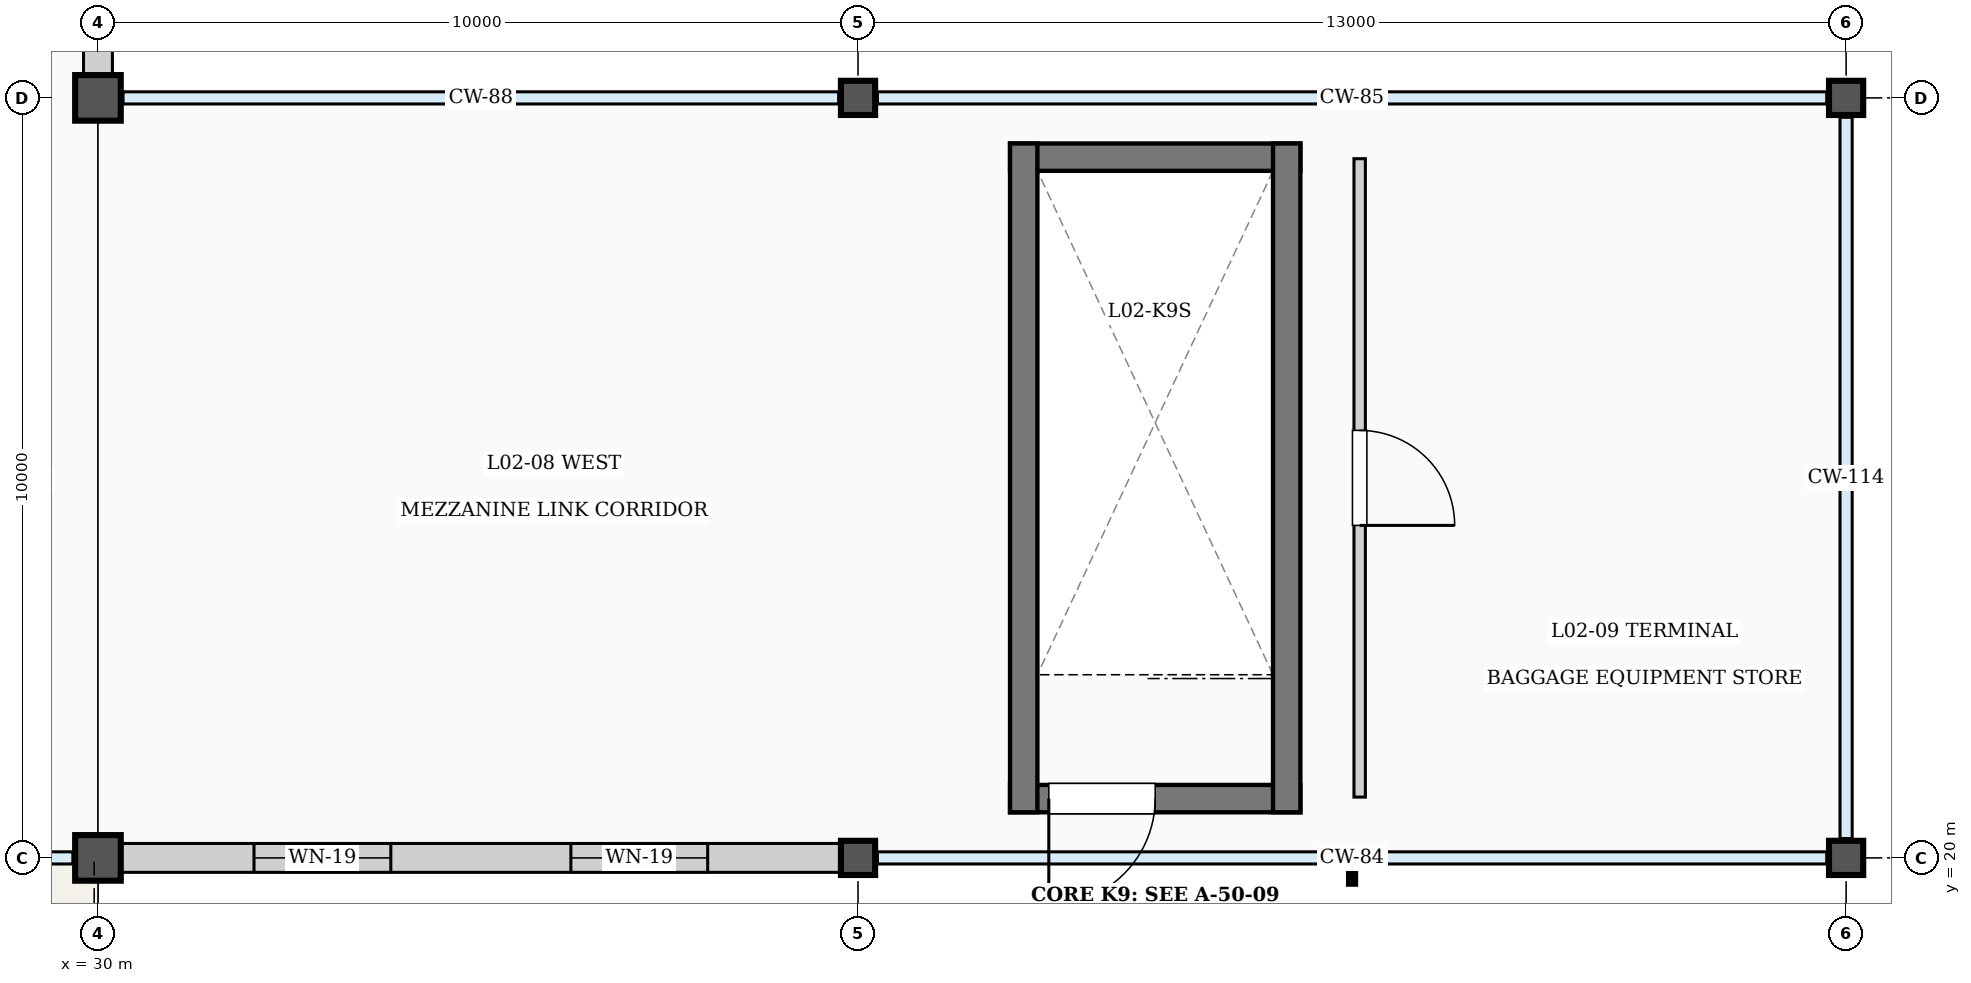
"""IFC4 building model, lengths in metres.
Left out: names, types, materials, properties, quantities, classifications, styles, units other than length and angle.
Written with IfcOpenShell. Run it as: python <this file> out.ifc"""

import sys

from ifc_helpers import new_model, si_unit, direction, frame, frame_2d, origin, origin_2d, place, context, subcontext, project, spatial, rectangle, extrude, element, fill, save


model = new_model("IFC4")
c1 = context("Model", 3, precision=1e-05, world=origin(), true_north=direction((0.0, 1.0)))
c2 = subcontext(c1, "Body", "Model", "MODEL_VIEW")
j1 = project(units=[si_unit("LENGTHUNIT", "METRE"), si_unit("PLANEANGLEUNIT", "RADIAN")], contexts=[c1])
p1 = place(None, origin())
s1 = spatial("IfcSite", under=j1, at=p1, CompositionType="ELEMENT")
p2 = place(p1, origin())
s2 = spatial("IfcBuilding", under=s1, at=p2, CompositionType="ELEMENT")
p3 = place(p2, frame((0.0, 0.0, 10.2)))
s3 = spatial("IfcBuildingStorey", under=s2, at=p3, CompositionType="ELEMENT", Elevation=10.2)
for number, where, z_axis, x_axis in (
    (1, (30.0, 20.0, 0.0), (0.0, 0.0, 1.0), (1.0, 0.0, 0.0)),
    (2, (30.0, 30.0, 0.0), (0.0, 0.0, 1.0), (1.0, 0.0, 0.0)),
):
    element("IfcColumn", number, at=place(p3, frame(where, z_axis=z_axis, x_axis=x_axis)), inside=s3, PredefinedType="COLUMN", context=c2, shape_type="SweptSolid", body=[
        extrude(rectangle(XDim=0.6, YDim=0.6, at=origin_2d()), origin(), (0.0, 0.0, 1.0), 4.2),
    ])
for number, where, z_axis, x_axis in (
    (3, (40.0, 20.0, 0.0), (0.0, 0.0, 1.0), (1.0, 0.0, 0.0)),
    (4, (40.0, 30.0, 0.0), (0.0, 0.0, 1.0), (1.0, 0.0, 0.0)),
    (5, (53.0, 20.0, 0.0), (0.0, 0.0, 1.0), (1.0, 0.0, 0.0)),
    (6, (53.0, 30.0, 0.0), (0.0, 0.0, 1.0), (1.0, 0.0, 0.0)),
):
    element("IfcColumn", number, at=place(p3, frame(where, z_axis=z_axis, x_axis=x_axis)), inside=s3, PredefinedType="COLUMN", context=c2, shape_type="SweptSolid", body=[
        extrude(rectangle(XDim=0.45, YDim=0.45, at=origin_2d()), origin(), (0.0, 0.0, 1.0), 4.2),
    ])
p4 = place(p3, frame((30.3, 20.0, 0.0), z_axis=(0.0, 0.0, 1.0), x_axis=(1.0, 0.0, 0.0)))
e7 = element("IfcWall", 7, at=p4, inside=s3, PredefinedType="SOLIDWALL", context=c2, shape_type="SweptSolid", body=[
    extrude(rectangle(XDim=9.475, YDim=0.38, at=frame_2d((4.737, 0.0))), origin(), (0.0, 0.0, 1.0), 3.63),
])
p5 = place(p4, frame((1.753, 0.0, 0.9)))
e8 = element("IfcOpeningElement", 8, at=p5, cuts=e7, PredefinedType="OPENING", context=c2, shape_type="SweptSolid", body=[
    extrude(rectangle(XDim=1.8, YDim=2.1, at=frame_2d((0.9, 1.05))), frame((0.0, 0.2, 0.0), z_axis=(0.0, -1.0, 0.0), x_axis=(1.0, 0.0, 0.0)), (0.0, 0.0, 1.0), 0.4),
])
p6 = place(p4, frame((5.922, 0.0, 0.9)))
e9 = element("IfcOpeningElement", 9, at=p6, cuts=e7, PredefinedType="OPENING", context=c2, shape_type="SweptSolid", body=[
    extrude(rectangle(XDim=1.8, YDim=2.1, at=frame_2d((0.9, 1.05))), frame((0.0, 0.2, 0.0), z_axis=(0.0, -1.0, 0.0), x_axis=(1.0, 0.0, 0.0)), (0.0, 0.0, 1.0), 0.4),
])
p7 = place(p3, frame((30.0, 39.7, 0.0), z_axis=(0.0, 0.0, 1.0), x_axis=(0.0, -1.0, 0.0)))
e10 = element("IfcWall", 10, at=p7, inside=s3, PredefinedType="SOLIDWALL", context=c2, shape_type="SweptSolid", body=[
    extrude(rectangle(XDim=9.4, YDim=0.38, at=frame_2d((4.7, 0.0))), origin(), (0.0, 0.0, 1.0), 3.27),
])
p8 = place(p7, frame((1.732, 0.0, 0.9)))
e11 = element("IfcOpeningElement", 11, at=p8, cuts=e10, PredefinedType="OPENING", context=c2, shape_type="SweptSolid", body=[
    extrude(rectangle(XDim=1.8, YDim=1.5, at=frame_2d((0.9, 0.75))), frame((0.0, 0.2, 0.0), z_axis=(0.0, -1.0, 0.0), x_axis=(1.0, 0.0, 0.0)), (0.0, 0.0, 1.0), 0.4),
])
p9 = place(p7, frame((5.868, 0.0, 0.9)))
e12 = element("IfcOpeningElement", 12, at=p9, cuts=e10, PredefinedType="OPENING", context=c2, shape_type="SweptSolid", body=[
    extrude(rectangle(XDim=1.8, YDim=1.5, at=frame_2d((0.9, 0.75))), frame((0.0, 0.2, 0.0), z_axis=(0.0, -1.0, 0.0), x_axis=(1.0, 0.0, 0.0)), (0.0, 0.0, 1.0), 0.4),
])
p10 = place(p3, frame((42.0, 20.78, 0.0), z_axis=(0.0, 0.0, 1.0), x_axis=(1.0, 0.0, 0.0)))
e13 = element("IfcWall", 13, at=p10, inside=s3, PredefinedType="SHEAR", context=c2, shape_type="SweptSolid", body=[
    extrude(rectangle(XDim=3.82, YDim=0.36, at=frame_2d((1.91, 0.0))), origin(), (0.0, 0.0, 1.0), 4.2),
])
p11 = place(p10, frame((0.51, 0.0, 0.0)))
e14 = element("IfcOpeningElement", 14, at=p11, cuts=e13, PredefinedType="OPENING", context=c2, shape_type="SweptSolid", body=[
    extrude(rectangle(XDim=1.4, YDim=2.35, at=frame_2d((0.7, 1.175))), frame((0.0, 0.19, 0.0), z_axis=(0.0, -1.0, 0.0), x_axis=(1.0, 0.0, 0.0)), (0.0, 0.0, 1.0), 0.38),
])
p12 = place(p3, frame((42.0, 29.22, 0.0), z_axis=(0.0, 0.0, 1.0), x_axis=(1.0, 0.0, 0.0)))
e15 = element("IfcWall", 15, at=p12, inside=s3, PredefinedType="SHEAR", context=c2, shape_type="SweptSolid", body=[
    extrude(rectangle(XDim=3.82, YDim=0.36, at=frame_2d((1.91, 0.0))), origin(), (0.0, 0.0, 1.0), 4.2),
])
for number, where, z_axis, x_axis in (
    (16, (42.18, 20.6, 0.0), (0.0, 0.0, 1.0), (0.0, 1.0, 0.0)),
    (17, (45.64, 20.6, 0.0), (0.0, 0.0, 1.0), (0.0, 1.0, 0.0)),
):
    element("IfcWall", number, at=place(p3, frame(where, z_axis=z_axis, x_axis=x_axis)), inside=s3, PredefinedType="SHEAR", context=c2, shape_type="SweptSolid", body=[
        extrude(rectangle(XDim=8.8, YDim=0.36, at=frame_2d((4.4, 0.0))), origin(), (0.0, 0.0, 1.0), 4.2),
    ])
p13 = place(p3, frame((46.6, 20.8, 0.0), z_axis=(0.0, 0.0, 1.0), x_axis=(0.0, 1.0, 0.0)))
e18 = element("IfcWall", 18, at=p13, inside=s3, PredefinedType="PARTITIONING", context=c2, shape_type="SweptSolid", body=[
    extrude(rectangle(XDim=8.4, YDim=0.15, at=frame_2d((4.2, 0.0))), origin(), (0.0, 0.0, 1.0), 3.86),
])
p14 = place(p13, frame((3.575, 0.0, 0.0)))
e19 = element("IfcOpeningElement", 19, at=p14, cuts=e18, PredefinedType="OPENING", context=c2, shape_type="SweptSolid", body=[
    extrude(rectangle(XDim=1.25, YDim=2.4, at=frame_2d((0.625, 1.2))), frame((0.0, 0.085, 0.0), z_axis=(0.0, -1.0, 0.0), x_axis=(1.0, 0.0, 0.0)), (0.0, 0.0, 1.0), 0.17),
])
p15 = place(p5, origin())
e20 = element("IfcWindow", 20, at=p15, inside=s3, PartitioningType="SINGLE_PANEL", PredefinedType="WINDOW", context=c2, shape_type="SweptSolid", body=[
    extrude(rectangle(XDim=1.8, YDim=2.1, at=frame_2d((0.9, 1.05))), frame((0.0, 0.03, 0.0), z_axis=(0.0, -1.0, 0.0), x_axis=(1.0, 0.0, 0.0)), (0.0, 0.0, 1.0), 0.06),
])
fill(e8, e20)
p16 = place(p6, origin())
e21 = element("IfcWindow", 21, at=p16, inside=s3, PartitioningType="SINGLE_PANEL", PredefinedType="WINDOW", context=c2, shape_type="SweptSolid", body=[
    extrude(rectangle(XDim=1.8, YDim=2.1, at=frame_2d((0.9, 1.05))), frame((0.0, 0.03, 0.0), z_axis=(0.0, -1.0, 0.0), x_axis=(1.0, 0.0, 0.0)), (0.0, 0.0, 1.0), 0.06),
])
fill(e9, e21)
p17 = place(p11, origin())
e22 = element("IfcDoor", 22, at=p17, inside=s3, OperationType="SINGLE_SWING_LEFT", PredefinedType="DOOR", context=c2, shape_type="SweptSolid", body=[
    extrude(rectangle(XDim=1.4, YDim=2.35, at=frame_2d((0.7, 1.175))), frame((0.0, 0.025, 0.0), z_axis=(0.0, -1.0, 0.0), x_axis=(1.0, 0.0, 0.0)), (0.0, 0.0, 1.0), 0.05),
])
fill(e14, e22)
p18 = place(p14, origin())
e23 = element("IfcDoor", 23, at=p18, inside=s3, OperationType="SINGLE_SWING_LEFT", PredefinedType="DOOR", context=c2, shape_type="SweptSolid", body=[
    extrude(rectangle(XDim=1.25, YDim=2.4, at=frame_2d((0.625, 1.2))), frame((0.0, 0.025, 0.0), z_axis=(0.0, -1.0, 0.0), x_axis=(1.0, 0.0, 0.0)), (0.0, 0.0, 1.0), 0.05),
])
fill(e19, e23)
save(model, sys.argv[1])
